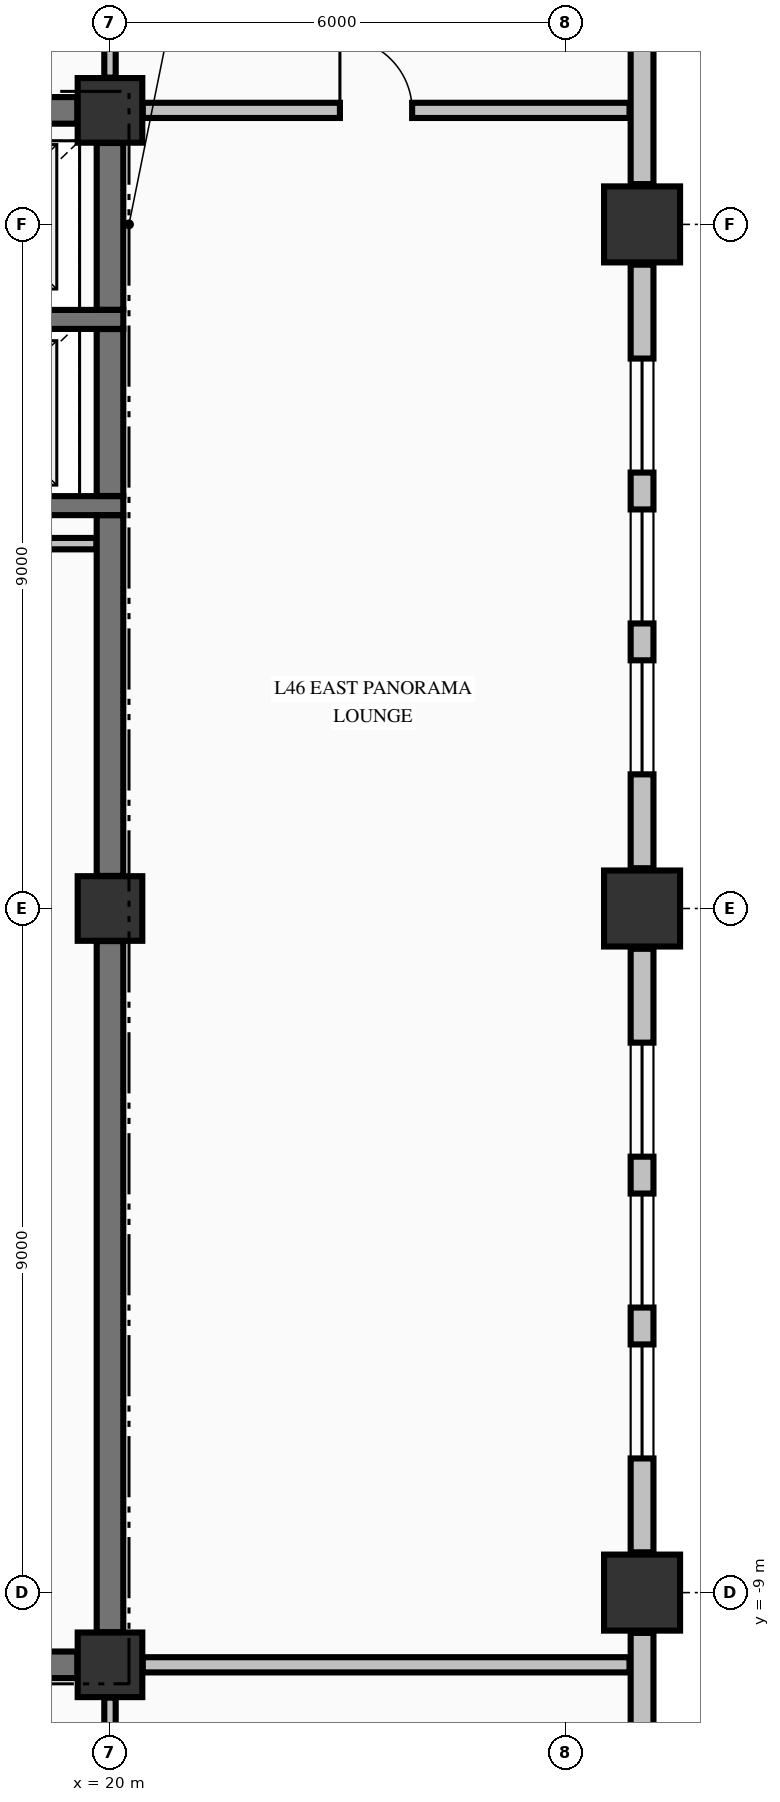
"""IFC4 building model, lengths in metres.
Left out: names, types, materials, properties, quantities, classifications, styles, units other than length and angle.
Written with IfcOpenShell. Run it as: python <this file> out.ifc"""

import sys

from ifc_helpers import new_model, si_unit, direction, frame, frame_2d, origin, origin_2d, place, context, subcontext, project, spatial, rectangle, extrude, element, fill, save


model = new_model("IFC4")
c1 = context("Model", 3, precision=1e-05, world=origin(), true_north=direction((0.0, 1.0)))
c2 = subcontext(c1, "Body", "Model", "MODEL_VIEW")
j1 = project(units=[si_unit("LENGTHUNIT", "METRE"), si_unit("PLANEANGLEUNIT", "RADIAN")], contexts=[c1])
p1 = place(None, origin())
s1 = spatial("IfcSite", under=j1, at=p1, CompositionType="ELEMENT")
p2 = place(p1, origin())
s2 = spatial("IfcBuilding", under=s1, at=p2, CompositionType="ELEMENT")
p3 = place(p2, frame((0.0, 0.0, 179.66)))
s3 = spatial("IfcBuildingStorey", under=s2, at=p3, CompositionType="ELEMENT", Elevation=179.66)
for number, where, z_axis, x_axis in (
    (1, (27.0, -9.0, -0.25), (0.0, 0.0, 1.0), (1.0, 0.0, 0.0)),
    (2, (27.0, 0.0, -0.25), (0.0, 0.0, 1.0), (1.0, 0.0, 0.0)),
    (3, (27.0, 9.0, -0.25), (0.0, 0.0, 1.0), (1.0, 0.0, 0.0)),
):
    element("IfcColumn", number, at=place(p3, frame(where, z_axis=z_axis, x_axis=x_axis)), inside=s3, PredefinedType="COLUMN", context=c2, shape_type="SweptSolid", body=[
        extrude(rectangle(XDim=1.0, YDim=1.0, at=origin_2d()), origin(), (0.0, 0.0, 1.0), 3.4),
    ])
for number, where, z_axis, x_axis in (
    (4, (20.0, -9.95, -0.25), (0.0, 0.0, 1.0), (1.0, 0.0, 0.0)),
    (5, (20.0, 10.5, -0.25), (0.0, 0.0, 1.0), (1.0, 0.0, 0.0)),
    (6, (20.0, 0.0, -0.25), (0.0, 0.0, 1.0), (1.0, 0.0, 0.0)),
):
    element("IfcColumn", number, at=place(p3, frame(where, z_axis=z_axis, x_axis=x_axis)), inside=s3, PredefinedType="COLUMN", context=c2, shape_type="SweptSolid", body=[
        extrude(rectangle(XDim=0.85, YDim=0.85, at=origin_2d()), origin(), (0.0, 0.0, 1.0), 3.4),
    ])
p4 = place(p3, frame((27.0, -18.97, 0.0), z_axis=(0.0, 0.0, 1.0), x_axis=(0.0, 1.0, 0.0)))
e7 = element("IfcWall", 7, at=p4, inside=s3, PredefinedType="STANDARD", context=c2, shape_type="SweptSolid", body=[
    extrude(rectangle(XDim=9.44, YDim=0.3, at=frame_2d((4.72, 0.0))), origin(), (0.0, 0.0, 1.0), 2.542),
])
p5 = place(p3, frame((27.0, -8.47, 0.0), z_axis=(0.0, 0.0, 1.0), x_axis=(0.0, 1.0, 0.0)))
e8 = element("IfcWall", 8, at=p5, inside=s3, PredefinedType="STANDARD", context=c2, shape_type="SweptSolid", body=[
    extrude(rectangle(XDim=7.94, YDim=0.3, at=frame_2d((3.97, 0.0))), origin(), (0.0, 0.0, 1.0), 2.542),
])
p6 = place(p5, frame((1.235, 0.0, 0.72)))
e9 = element("IfcOpeningElement", 9, at=p6, cuts=e8, PredefinedType="OPENING", context=c2, shape_type="SweptSolid", body=[
    extrude(rectangle(XDim=1.5, YDim=1.6, at=frame_2d((0.75, 0.8))), frame((0.0, 0.16, 0.0), z_axis=(0.0, -1.0, 0.0), x_axis=(1.0, 0.0, 0.0)), (0.0, 0.0, 1.0), 0.32),
])
p7 = place(p5, frame((3.22, 0.0, 0.72)))
e10 = element("IfcOpeningElement", 10, at=p7, cuts=e8, PredefinedType="OPENING", context=c2, shape_type="SweptSolid", body=[
    extrude(rectangle(XDim=1.5, YDim=1.6, at=frame_2d((0.75, 0.8))), frame((0.0, 0.16, 0.0), z_axis=(0.0, -1.0, 0.0), x_axis=(1.0, 0.0, 0.0)), (0.0, 0.0, 1.0), 0.32),
])
p8 = place(p5, frame((5.205, 0.0, 0.72)))
e11 = element("IfcOpeningElement", 11, at=p8, cuts=e8, PredefinedType="OPENING", context=c2, shape_type="SweptSolid", body=[
    extrude(rectangle(XDim=1.5, YDim=1.6, at=frame_2d((0.75, 0.8))), frame((0.0, 0.16, 0.0), z_axis=(0.0, -1.0, 0.0), x_axis=(1.0, 0.0, 0.0)), (0.0, 0.0, 1.0), 0.32),
])
p9 = place(p3, frame((27.0, 0.53, 0.0), z_axis=(0.0, 0.0, 1.0), x_axis=(0.0, 1.0, 0.0)))
e12 = element("IfcWall", 12, at=p9, inside=s3, PredefinedType="STANDARD", context=c2, shape_type="SweptSolid", body=[
    extrude(rectangle(XDim=7.94, YDim=0.3, at=frame_2d((3.97, 0.0))), origin(), (0.0, 0.0, 1.0), 2.542),
])
p10 = place(p9, frame((1.235, 0.0, 0.72)))
e13 = element("IfcOpeningElement", 13, at=p10, cuts=e12, PredefinedType="OPENING", context=c2, shape_type="SweptSolid", body=[
    extrude(rectangle(XDim=1.5, YDim=1.6, at=frame_2d((0.75, 0.8))), frame((0.0, 0.16, 0.0), z_axis=(0.0, -1.0, 0.0), x_axis=(1.0, 0.0, 0.0)), (0.0, 0.0, 1.0), 0.32),
])
p11 = place(p9, frame((3.22, 0.0, 0.72)))
e14 = element("IfcOpeningElement", 14, at=p11, cuts=e12, PredefinedType="OPENING", context=c2, shape_type="SweptSolid", body=[
    extrude(rectangle(XDim=1.5, YDim=1.6, at=frame_2d((0.75, 0.8))), frame((0.0, 0.16, 0.0), z_axis=(0.0, -1.0, 0.0), x_axis=(1.0, 0.0, 0.0)), (0.0, 0.0, 1.0), 0.32),
])
p12 = place(p9, frame((5.205, 0.0, 0.72)))
e15 = element("IfcOpeningElement", 15, at=p12, cuts=e12, PredefinedType="OPENING", context=c2, shape_type="SweptSolid", body=[
    extrude(rectangle(XDim=1.5, YDim=1.6, at=frame_2d((0.75, 0.8))), frame((0.0, 0.16, 0.0), z_axis=(0.0, -1.0, 0.0), x_axis=(1.0, 0.0, 0.0)), (0.0, 0.0, 1.0), 0.32),
])
p13 = place(p3, frame((27.0, 9.53, 0.0), z_axis=(0.0, 0.0, 1.0), x_axis=(0.0, 1.0, 0.0)))
e16 = element("IfcWall", 16, at=p13, inside=s3, PredefinedType="STANDARD", context=c2, shape_type="SweptSolid", body=[
    extrude(rectangle(XDim=9.44, YDim=0.3, at=frame_2d((4.72, 0.0))), origin(), (0.0, 0.0, 1.0), 2.542),
])
p14 = place(p3, frame((14.7, -9.95, 0.0), z_axis=(0.0, 0.0, 1.0), x_axis=(1.0, 0.0, 0.0)))
e17 = element("IfcWall", 17, at=p14, inside=s3, PredefinedType="SHEAR", context=c2, shape_type="SweptSolid", body=[
    extrude(rectangle(XDim=4.871, YDim=0.35, at=frame_2d((2.436, 0.0))), origin(), (0.0, 0.0, 1.0), 3.15),
])
p15 = place(p14, frame((2.125, 0.0, 0.0)))
e18 = element("IfcOpeningElement", 18, at=p15, cuts=e17, PredefinedType="OPENING", context=c2, shape_type="SweptSolid", body=[
    extrude(rectangle(XDim=1.05, YDim=2.15, at=frame_2d((0.525, 1.075))), frame((0.0, 0.185, 0.0), z_axis=(0.0, -1.0, 0.0), x_axis=(1.0, 0.0, 0.0)), (0.0, 0.0, 1.0), 0.37),
])
for number, where, z_axis, x_axis in (
    (19, (17.025, 5.3, 0.0), (0.0, 0.0, 1.0), (1.0, 0.0, 0.0)),
    (20, (17.025, 7.75, 0.0), (0.0, 0.0, 1.0), (1.0, 0.0, 0.0)),
):
    element("IfcWall", number, at=place(p3, frame(where, z_axis=z_axis, x_axis=x_axis)), inside=s3, PredefinedType="SOLIDWALL", context=c2, shape_type="SweptSolid", body=[
        extrude(rectangle(XDim=3.15, YDim=0.25, at=frame_2d((1.575, 0.0))), origin(), (0.0, 0.0, 1.0), 3.15),
    ])
p16 = place(p3, frame((14.7, 10.5, 0.0), z_axis=(0.0, 0.0, 1.0), x_axis=(1.0, 0.0, 0.0)))
e21 = element("IfcWall", 21, at=p16, inside=s3, PredefinedType="SHEAR", context=c2, shape_type="SweptSolid", body=[
    extrude(rectangle(XDim=4.871, YDim=0.35, at=frame_2d((2.436, 0.0))), origin(), (0.0, 0.0, 1.0), 3.15),
])
p17 = place(p16, frame((0.7, 0.0, 0.0)))
e22 = element("IfcOpeningElement", 22, at=p17, cuts=e21, PredefinedType="OPENING", context=c2, shape_type="SweptSolid", body=[
    extrude(rectangle(XDim=1.1, YDim=2.15, at=frame_2d((0.55, 1.075))), frame((0.0, 0.185, 0.0), z_axis=(0.0, -1.0, 0.0), x_axis=(1.0, 0.0, 0.0)), (0.0, 0.0, 1.0), 0.37),
])
p18 = place(p3, frame((20.431, -9.95, 0.0), z_axis=(0.0, 0.0, 1.0), x_axis=(1.0, 0.0, 0.0)))
e23 = element("IfcWall", 23, at=p18, inside=s3, PredefinedType="PARTITIONING", context=c2, shape_type="SweptSolid", body=[
    extrude(rectangle(XDim=6.404, YDim=0.2, at=frame_2d((3.202, 0.0))), origin(), (0.0, 0.0, 1.0), 3.15),
])
p19 = place(p3, frame((14.878, 4.8, 0.0), z_axis=(0.0, 0.0, 1.0), x_axis=(1.0, 0.0, 0.0)))
e24 = element("IfcWall", 24, at=p19, inside=s3, PredefinedType="PARTITIONING", context=c2, shape_type="SweptSolid", body=[
    extrude(rectangle(XDim=4.944, YDim=0.15, at=frame_2d((2.472, 0.0))), origin(), (0.0, 0.0, 1.0), 3.15),
])
p20 = place(p3, frame((20.431, 10.5, 0.0), z_axis=(0.0, 0.0, 1.0), x_axis=(1.0, 0.0, 0.0)))
e25 = element("IfcWall", 25, at=p20, inside=s3, PredefinedType="PARTITIONING", context=c2, shape_type="SweptSolid", body=[
    extrude(rectangle(XDim=6.404, YDim=0.2, at=frame_2d((3.202, 0.0))), origin(), (0.0, 0.0, 1.0), 3.15),
])
p21 = place(p20, frame((2.594, 0.0, 0.0)))
e26 = element("IfcOpeningElement", 26, at=p21, cuts=e25, PredefinedType="OPENING", context=c2, shape_type="SweptSolid", body=[
    extrude(rectangle(XDim=0.95, YDim=2.15, at=frame_2d((0.475, 1.075))), frame((0.0, 0.11, 0.0), z_axis=(0.0, -1.0, 0.0), x_axis=(1.0, 0.0, 0.0)), (0.0, 0.0, 1.0), 0.22),
])
p22 = place(p3, frame((20.0, -9.521, 0.0), z_axis=(0.0, 0.0, 1.0), x_axis=(0.0, 1.0, 0.0)))
e27 = element("IfcWall", 27, at=p22, inside=s3, PredefinedType="SHEAR", context=c2, shape_type="SweptSolid", body=[
    extrude(rectangle(XDim=9.092, YDim=0.35, at=frame_2d((4.546, 0.0))), origin(), (0.0, 0.0, 1.0), 3.15),
])
p23 = place(p3, frame((20.0, 0.429, 0.0), z_axis=(0.0, 0.0, 1.0), x_axis=(0.0, 1.0, 0.0)))
e28 = element("IfcWall", 28, at=p23, inside=s3, PredefinedType="SHEAR", context=c2, shape_type="SweptSolid", body=[
    extrude(rectangle(XDim=4.744, YDim=0.35, at=frame_2d((2.372, 0.0))), origin(), (0.0, 0.0, 1.0), 3.15),
])
p24 = place(p3, frame((20.0, 5.427, 0.0), z_axis=(0.0, 0.0, 1.0), x_axis=(0.0, 1.0, 0.0)))
e29 = element("IfcWall", 29, at=p24, inside=s3, PredefinedType="SHEAR", context=c2, shape_type="SweptSolid", body=[
    extrude(rectangle(XDim=2.196, YDim=0.35, at=frame_2d((1.098, 0.0))), origin(), (0.0, 0.0, 1.0), 3.15),
])
p25 = place(p3, frame((20.0, 7.877, 0.0), z_axis=(0.0, 0.0, 1.0), x_axis=(0.0, 1.0, 0.0)))
e30 = element("IfcWall", 30, at=p25, inside=s3, PredefinedType="SHEAR", context=c2, shape_type="SweptSolid", body=[
    extrude(rectangle(XDim=2.194, YDim=0.35, at=frame_2d((1.097, 0.0))), origin(), (0.0, 0.0, 1.0), 3.15),
])
p26 = place(p3, frame((20.0, -12.097, 0.0), z_axis=(0.0, 0.0, 1.0), x_axis=(0.0, 1.0, 0.0)))
e31 = element("IfcWall", 31, at=p26, inside=s3, PredefinedType="PARTITIONING", context=c2, shape_type="SweptSolid", body=[
    extrude(rectangle(XDim=1.716, YDim=0.15, at=frame_2d((0.858, 0.0))), origin(), (0.0, 0.0, 1.0), 2.342),
])
p27 = place(p3, frame((20.0, 10.931, 0.0), z_axis=(0.0, 0.0, 1.0), x_axis=(0.0, 1.0, 0.0)))
e32 = element("IfcWall", 32, at=p27, inside=s3, PredefinedType="PARTITIONING", context=c2, shape_type="SweptSolid", body=[
    extrude(rectangle(XDim=2.516, YDim=0.15, at=frame_2d((1.258, 0.0))), origin(), (0.0, 0.0, 1.0), 2.342),
])
p28 = place(p27, frame((0.624, 0.0, 0.0)))
e33 = element("IfcOpeningElement", 33, at=p28, cuts=e32, PredefinedType="OPENING", context=c2, shape_type="SweptSolid", body=[
    extrude(rectangle(XDim=0.95, YDim=2.15, at=frame_2d((0.475, 1.075))), frame((0.0, 0.085, 0.0), z_axis=(0.0, -1.0, 0.0), x_axis=(1.0, 0.0, 0.0)), (0.0, 0.0, 1.0), 0.17),
])
p29 = place(p6, origin())
e34 = element("IfcWindow", 34, at=p29, inside=s3, PartitioningType="SINGLE_PANEL", PredefinedType="WINDOW", context=c2, shape_type="SweptSolid", body=[
    extrude(rectangle(XDim=1.5, YDim=1.6, at=frame_2d((0.75, 0.8))), frame((0.0, 0.03, 0.0), z_axis=(0.0, -1.0, 0.0), x_axis=(1.0, 0.0, 0.0)), (0.0, 0.0, 1.0), 0.06),
])
fill(e9, e34)
p30 = place(p7, origin())
e35 = element("IfcWindow", 35, at=p30, inside=s3, PartitioningType="SINGLE_PANEL", PredefinedType="WINDOW", context=c2, shape_type="SweptSolid", body=[
    extrude(rectangle(XDim=1.5, YDim=1.6, at=frame_2d((0.75, 0.8))), frame((0.0, 0.03, 0.0), z_axis=(0.0, -1.0, 0.0), x_axis=(1.0, 0.0, 0.0)), (0.0, 0.0, 1.0), 0.06),
])
fill(e10, e35)
p31 = place(p8, origin())
e36 = element("IfcWindow", 36, at=p31, inside=s3, PartitioningType="SINGLE_PANEL", PredefinedType="WINDOW", context=c2, shape_type="SweptSolid", body=[
    extrude(rectangle(XDim=1.5, YDim=1.6, at=frame_2d((0.75, 0.8))), frame((0.0, 0.03, 0.0), z_axis=(0.0, -1.0, 0.0), x_axis=(1.0, 0.0, 0.0)), (0.0, 0.0, 1.0), 0.06),
])
fill(e11, e36)
p32 = place(p10, origin())
e37 = element("IfcWindow", 37, at=p32, inside=s3, PartitioningType="SINGLE_PANEL", PredefinedType="WINDOW", context=c2, shape_type="SweptSolid", body=[
    extrude(rectangle(XDim=1.5, YDim=1.6, at=frame_2d((0.75, 0.8))), frame((0.0, 0.03, 0.0), z_axis=(0.0, -1.0, 0.0), x_axis=(1.0, 0.0, 0.0)), (0.0, 0.0, 1.0), 0.06),
])
fill(e13, e37)
p33 = place(p11, origin())
e38 = element("IfcWindow", 38, at=p33, inside=s3, PartitioningType="SINGLE_PANEL", PredefinedType="WINDOW", context=c2, shape_type="SweptSolid", body=[
    extrude(rectangle(XDim=1.5, YDim=1.6, at=frame_2d((0.75, 0.8))), frame((0.0, 0.03, 0.0), z_axis=(0.0, -1.0, 0.0), x_axis=(1.0, 0.0, 0.0)), (0.0, 0.0, 1.0), 0.06),
])
fill(e14, e38)
p34 = place(p12, origin())
e39 = element("IfcWindow", 39, at=p34, inside=s3, PartitioningType="SINGLE_PANEL", PredefinedType="WINDOW", context=c2, shape_type="SweptSolid", body=[
    extrude(rectangle(XDim=1.5, YDim=1.6, at=frame_2d((0.75, 0.8))), frame((0.0, 0.03, 0.0), z_axis=(0.0, -1.0, 0.0), x_axis=(1.0, 0.0, 0.0)), (0.0, 0.0, 1.0), 0.06),
])
fill(e15, e39)
p35 = place(p21, origin())
e40 = element("IfcDoor", 40, at=p35, inside=s3, OperationType="SINGLE_SWING_LEFT", PredefinedType="DOOR", context=c2, shape_type="SweptSolid", body=[
    extrude(rectangle(XDim=0.95, YDim=2.15, at=frame_2d((0.475, 1.075))), frame((0.0, 0.025, 0.0), z_axis=(0.0, -1.0, 0.0), x_axis=(1.0, 0.0, 0.0)), (0.0, 0.0, 1.0), 0.05),
])
fill(e26, e40)
save(model, sys.argv[1])
